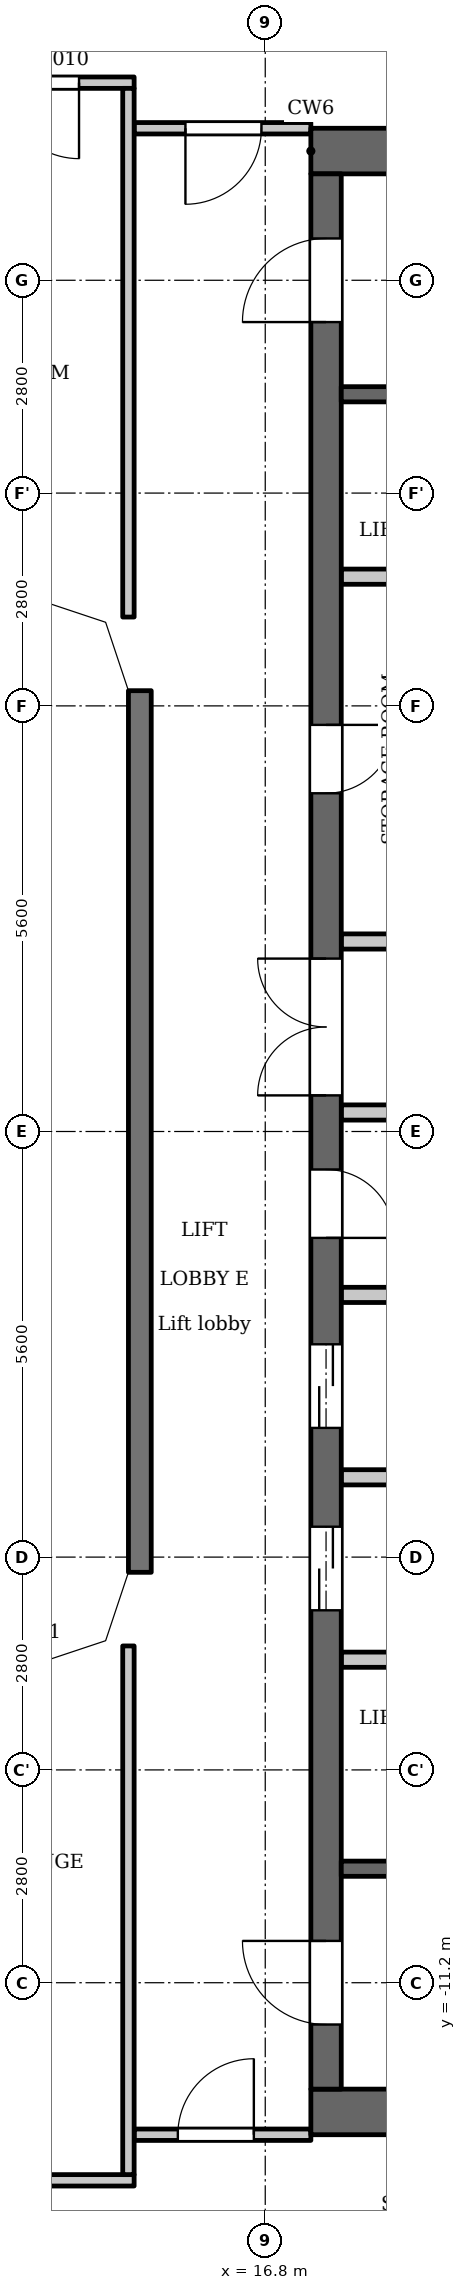
"""IFC4 building model, lengths in metres.
Left out: names, types, materials, properties, quantities, classifications, styles, units other than length and angle.
Written with IfcOpenShell. Run it as: python <this file> out.ifc"""

import sys

from ifc_helpers import new_model, si_unit, direction, frame, frame_2d, origin, place, context, subcontext, project, spatial, polyline, rectangle, outline, extrude, element, fill, save


model = new_model("IFC4")
c1 = context("Model", 3, precision=1e-05, world=origin(), true_north=direction((0.0, 1.0)))
c2 = subcontext(c1, "Body", "Model", "MODEL_VIEW")
j1 = project(units=[si_unit("LENGTHUNIT", "METRE"), si_unit("PLANEANGLEUNIT", "RADIAN")], contexts=[c1])
p1 = place(None, origin())
s1 = spatial("IfcSite", under=j1, at=p1, CompositionType="ELEMENT")
p2 = place(p1, origin())
s2 = spatial("IfcBuilding", under=s1, at=p2, CompositionType="ELEMENT")
p3 = place(p2, frame((0.0, 0.0, 248.7)))
s3 = spatial("IfcBuildingStorey", under=s2, at=p3, CompositionType="ELEMENT", Elevation=248.7)
p4 = place(p3, frame((15.15, 5.8, 0.0), z_axis=(0.0, 0.0, 1.0), x_axis=(0.0, -1.0, 0.0)))
e1 = element("IfcWall", 1, at=p4, inside=s3, PredefinedType="SOLIDWALL", context=c2, shape_type="SweptSolid", body=[
    extrude(rectangle(XDim=11.6, YDim=0.3, at=frame_2d((5.8, 0.0))), origin(), (0.0, 0.0, 1.0), 3.2),
])
for number, where, z_axis, x_axis in (
    (2, (17.4, 12.9, 0.0), (0.0, 0.0, 1.0), (1.0, 0.0, 0.0)),
    (3, (17.4, -12.9, 0.0), (0.0, 0.0, 1.0), (1.0, 0.0, 0.0)),
):
    element("IfcWall", number, at=place(p3, frame(where, z_axis=z_axis, x_axis=x_axis)), inside=s3, PredefinedType="SHEAR", context=c2, shape_type="SweptSolid", body=[
        extrude(rectangle(XDim=7.32, YDim=0.6, at=frame_2d((3.66, 0.0))), origin(), (0.0, 0.0, 1.0), 3.2),
    ])
p5 = place(p3, frame((17.6, -12.6, 0.0), z_axis=(0.0, 0.0, 1.0), x_axis=(0.0, 1.0, 0.0)))
e4 = element("IfcWall", 4, at=p5, inside=s3, PredefinedType="SHEAR", context=c2, shape_type="SweptSolid", body=[
    extrude(rectangle(XDim=25.2, YDim=0.4, at=frame_2d((12.6, 0.0))), origin(), (0.0, 0.0, 1.0), 3.2),
])
p6 = place(p5, frame((6.3, 0.0, 0.0)))
e5 = element("IfcOpeningElement", 5, at=p6, cuts=e4, PredefinedType="OPENING", context=c2, shape_type="SweptSolid", body=[
    extrude(rectangle(XDim=1.1, YDim=2.1, at=frame_2d((0.55, 1.05))), frame((0.0, 0.21, 0.0), z_axis=(0.0, -1.0, 0.0), x_axis=(1.0, 0.0, 0.0)), (0.0, 0.0, 1.0), 0.42),
])
p7 = place(p5, frame((8.7, 0.0, 0.0)))
e6 = element("IfcOpeningElement", 6, at=p7, cuts=e4, PredefinedType="OPENING", context=c2, shape_type="SweptSolid", body=[
    extrude(rectangle(XDim=1.1, YDim=2.1, at=frame_2d((0.55, 1.05))), frame((0.0, 0.21, 0.0), z_axis=(0.0, -1.0, 0.0), x_axis=(1.0, 0.0, 0.0)), (0.0, 0.0, 1.0), 0.42),
])
p8 = place(p5, frame((11.2, 0.0, 0.0)))
e7 = element("IfcOpeningElement", 7, at=p8, cuts=e4, PredefinedType="OPENING", context=c2, shape_type="SweptSolid", body=[
    extrude(rectangle(XDim=0.9, YDim=2.1, at=frame_2d((0.45, 1.05))), frame((0.0, 0.21, 0.0), z_axis=(0.0, -1.0, 0.0), x_axis=(1.0, 0.0, 0.0)), (0.0, 0.0, 1.0), 0.42),
])
p9 = place(p5, frame((17.05, 0.0, 0.0)))
e8 = element("IfcOpeningElement", 8, at=p9, cuts=e4, PredefinedType="OPENING", context=c2, shape_type="SweptSolid", body=[
    extrude(rectangle(XDim=0.9, YDim=2.1, at=frame_2d((0.45, 1.05))), frame((0.0, 0.21, 0.0), z_axis=(0.0, -1.0, 0.0), x_axis=(1.0, 0.0, 0.0)), (0.0, 0.0, 1.0), 0.42),
])
p10 = place(p5, frame((23.25, 0.0, 0.0)))
e9 = element("IfcOpeningElement", 9, at=p10, cuts=e4, PredefinedType="OPENING", context=c2, shape_type="SweptSolid", body=[
    extrude(rectangle(XDim=1.1, YDim=2.1, at=frame_2d((0.55, 1.05))), frame((0.0, 0.21, 0.0), z_axis=(0.0, -1.0, 0.0), x_axis=(1.0, 0.0, 0.0)), (0.0, 0.0, 1.0), 0.42),
])
p11 = place(p5, frame((0.85, 0.0, 0.0)))
e10 = element("IfcOpeningElement", 10, at=p11, cuts=e4, PredefinedType="OPENING", context=c2, shape_type="SweptSolid", body=[
    extrude(rectangle(XDim=1.1, YDim=2.1, at=frame_2d((0.55, 1.05))), frame((0.0, 0.21, 0.0), z_axis=(0.0, -1.0, 0.0), x_axis=(1.0, 0.0, 0.0)), (0.0, 0.0, 1.0), 0.42),
])
p12 = place(p5, frame((13.075, 0.0, 0.0)))
e11 = element("IfcOpeningElement", 11, at=p12, cuts=e4, PredefinedType="OPENING", context=c2, shape_type="SweptSolid", body=[
    extrude(rectangle(XDim=1.8, YDim=2.1, at=frame_2d((0.9, 1.05))), frame((0.0, 0.21, 0.0), z_axis=(0.0, -1.0, 0.0), x_axis=(1.0, 0.0, 0.0)), (0.0, 0.0, 1.0), 0.42),
])
p13 = place(p3, frame((17.8, -9.7, 0.0), z_axis=(0.0, 0.0, 1.0), x_axis=(1.0, 0.0, 0.0)))
e12 = element("IfcWall", 12, at=p13, inside=s3, PredefinedType="SHEAR", context=c2, shape_type="SweptSolid", body=[
    extrude(rectangle(XDim=5.8, YDim=0.2, at=frame_2d((2.9, 0.0))), origin(), (0.0, 0.0, 1.0), 3.2),
])
p14 = place(p13, frame((0.85, 0.0, 0.0)))
e13 = element("IfcOpeningElement", 13, at=p14, cuts=e12, PredefinedType="OPENING", context=c2, shape_type="SweptSolid", body=[
    extrude(rectangle(XDim=1.1, YDim=2.1, at=frame_2d((0.55, 1.05))), frame((0.0, 0.11, 0.0), z_axis=(0.0, -1.0, 0.0), x_axis=(1.0, 0.0, 0.0)), (0.0, 0.0, 1.0), 0.22),
])
p15 = place(p13, frame((3.75, 0.0, 0.0)))
e14 = element("IfcOpeningElement", 14, at=p15, cuts=e12, PredefinedType="OPENING", context=c2, shape_type="SweptSolid", body=[
    extrude(rectangle(XDim=1.1, YDim=2.1, at=frame_2d((0.55, 1.05))), frame((0.0, 0.11, 0.0), z_axis=(0.0, -1.0, 0.0), x_axis=(1.0, 0.0, 0.0)), (0.0, 0.0, 1.0), 0.22),
])
for number, where, z_axis, x_axis in (
    (15, (17.8, -6.95, 0.0), (0.0, 0.0, 1.0), (1.0, 0.0, 0.0)),
    (16, (17.8, -4.55, 0.0), (0.0, 0.0, 1.0), (1.0, 0.0, 0.0)),
    (17, (17.8, -2.15, 0.0), (0.0, 0.0, 1.0), (1.0, 0.0, 0.0)),
):
    element("IfcWall", number, at=place(p3, frame(where, z_axis=z_axis, x_axis=x_axis)), inside=s3, PredefinedType="PARTITIONING", context=c2, shape_type="SweptSolid", body=[
        extrude(rectangle(XDim=2.8, YDim=0.2, at=frame_2d((1.4, 0.0))), origin(), (0.0, 0.0, 1.0), 3.2),
    ])
p16 = place(p3, frame((17.8, 0.25, 0.0), z_axis=(0.0, 0.0, 1.0), x_axis=(1.0, 0.0, 0.0)))
e18 = element("IfcWall", 18, at=p16, inside=s3, PredefinedType="PARTITIONING", context=c2, shape_type="SweptSolid", body=[
    extrude(rectangle(XDim=3.0, YDim=0.2, at=frame_2d((1.5, 0.0))), origin(), (0.0, 0.0, 1.0), 3.2),
])
p17 = place(p3, frame((17.8, 2.5, 0.0), z_axis=(0.0, 0.0, 1.0), x_axis=(1.0, 0.0, 0.0)))
e19 = element("IfcWall", 19, at=p17, inside=s3, PredefinedType="PARTITIONING", context=c2, shape_type="SweptSolid", body=[
    extrude(rectangle(XDim=3.0, YDim=0.2, at=frame_2d((1.5, 0.0))), origin(), (0.0, 0.0, 1.0), 3.2),
])
p18 = place(p17, frame((1.7, 0.0, 0.0)))
e20 = element("IfcOpeningElement", 20, at=p18, cuts=e19, PredefinedType="OPENING", context=c2, shape_type="SweptSolid", body=[
    extrude(rectangle(XDim=0.9, YDim=2.1, at=frame_2d((0.45, 1.05))), frame((0.0, 0.11, 0.0), z_axis=(0.0, -1.0, 0.0), x_axis=(1.0, 0.0, 0.0)), (0.0, 0.0, 1.0), 0.22),
])
p19 = place(p3, frame((17.8, 7.3, 0.0), z_axis=(0.0, 0.0, 1.0), x_axis=(1.0, 0.0, 0.0)))
e21 = element("IfcWall", 21, at=p19, inside=s3, PredefinedType="PARTITIONING", context=c2, shape_type="SweptSolid", body=[
    extrude(rectangle(XDim=2.8, YDim=0.2, at=frame_2d((1.4, 0.0))), origin(), (0.0, 0.0, 1.0), 3.2),
])
p20 = place(p3, frame((17.8, 9.7, 0.0), z_axis=(0.0, 0.0, 1.0), x_axis=(1.0, 0.0, 0.0)))
e22 = element("IfcWall", 22, at=p20, inside=s3, PredefinedType="SHEAR", context=c2, shape_type="SweptSolid", body=[
    extrude(rectangle(XDim=5.8, YDim=0.2, at=frame_2d((2.9, 0.0))), origin(), (0.0, 0.0, 1.0), 3.2),
])
p21 = place(p20, frame((0.85, 0.0, 0.0)))
e23 = element("IfcOpeningElement", 23, at=p21, cuts=e22, PredefinedType="OPENING", context=c2, shape_type="SweptSolid", body=[
    extrude(rectangle(XDim=1.1, YDim=2.1, at=frame_2d((0.55, 1.05))), frame((0.0, 0.11, 0.0), z_axis=(0.0, -1.0, 0.0), x_axis=(1.0, 0.0, 0.0)), (0.0, 0.0, 1.0), 0.22),
])
p22 = place(p20, frame((3.75, 0.0, 0.0)))
e24 = element("IfcOpeningElement", 24, at=p22, cuts=e22, PredefinedType="OPENING", context=c2, shape_type="SweptSolid", body=[
    extrude(rectangle(XDim=1.1, YDim=2.1, at=frame_2d((0.55, 1.05))), frame((0.0, 0.11, 0.0), z_axis=(0.0, -1.0, 0.0), x_axis=(1.0, 0.0, 0.0)), (0.0, 0.0, 1.0), 0.22),
])
p23 = place(p3, frame((-15.075, -13.8, 0.0), z_axis=(0.0, 0.0, 1.0), x_axis=(1.0, 0.0, 0.0)))
e25 = element("IfcWall", 25, at=p23, inside=s3, PredefinedType="PARTITIONING", context=c2, shape_type="SweptSolid", body=[
    extrude(rectangle(XDim=30.15, YDim=0.15, at=frame_2d((15.075, 0.0))), origin(), (0.0, 0.0, 1.0), 3.2),
])
p24 = place(p23, frame((2.225, 0.0, 0.0)))
e26 = element("IfcOpeningElement", 26, at=p24, cuts=e25, PredefinedType="OPENING", context=c2, shape_type="SweptSolid", body=[
    extrude(rectangle(XDim=1.0, YDim=2.1, at=frame_2d((0.5, 1.05))), frame((0.0, 0.085, 0.0), z_axis=(0.0, -1.0, 0.0), x_axis=(1.0, 0.0, 0.0)), (0.0, 0.0, 1.0), 0.17),
])
p25 = place(p23, frame((4.575, 0.0, 0.0)))
e27 = element("IfcOpeningElement", 27, at=p25, cuts=e25, PredefinedType="OPENING", context=c2, shape_type="SweptSolid", body=[
    extrude(rectangle(XDim=1.0, YDim=2.1, at=frame_2d((0.5, 1.05))), frame((0.0, 0.085, 0.0), z_axis=(0.0, -1.0, 0.0), x_axis=(1.0, 0.0, 0.0)), (0.0, 0.0, 1.0), 0.17),
])
p26 = place(p23, frame((13.425, 0.0, 0.0)))
e28 = element("IfcOpeningElement", 28, at=p26, cuts=e25, PredefinedType="OPENING", context=c2, shape_type="SweptSolid", body=[
    extrude(rectangle(XDim=1.0, YDim=2.1, at=frame_2d((0.5, 1.05))), frame((0.0, 0.085, 0.0), z_axis=(0.0, -1.0, 0.0), x_axis=(1.0, 0.0, 0.0)), (0.0, 0.0, 1.0), 0.17),
])
p27 = place(p23, frame((15.775, 0.0, 0.0)))
e29 = element("IfcOpeningElement", 29, at=p27, cuts=e25, PredefinedType="OPENING", context=c2, shape_type="SweptSolid", body=[
    extrude(rectangle(XDim=1.0, YDim=2.1, at=frame_2d((0.5, 1.05))), frame((0.0, 0.085, 0.0), z_axis=(0.0, -1.0, 0.0), x_axis=(1.0, 0.0, 0.0)), (0.0, 0.0, 1.0), 0.17),
])
p28 = place(p23, frame((24.625, 0.0, 0.0)))
e30 = element("IfcOpeningElement", 30, at=p28, cuts=e25, PredefinedType="OPENING", context=c2, shape_type="SweptSolid", body=[
    extrude(rectangle(XDim=1.0, YDim=2.1, at=frame_2d((0.5, 1.05))), frame((0.0, 0.085, 0.0), z_axis=(0.0, -1.0, 0.0), x_axis=(1.0, 0.0, 0.0)), (0.0, 0.0, 1.0), 0.17),
])
p29 = place(p23, frame((26.924, 0.0, 0.0)))
e31 = element("IfcOpeningElement", 31, at=p29, cuts=e25, PredefinedType="OPENING", context=c2, shape_type="SweptSolid", body=[
    extrude(rectangle(XDim=1.0, YDim=2.1, at=frame_2d((0.5, 1.05))), frame((0.0, 0.085, 0.0), z_axis=(0.0, -1.0, 0.0), x_axis=(1.0, 0.0, 0.0)), (0.0, 0.0, 1.0), 0.17),
])
p30 = place(p3, frame((15.075, -13.2, 0.0), z_axis=(0.0, 0.0, 1.0), x_axis=(1.0, 0.0, 0.0)))
e32 = element("IfcWall", 32, at=p30, inside=s3, PredefinedType="PARTITIONING", context=c2, shape_type="SweptSolid", body=[
    extrude(rectangle(XDim=2.325, YDim=0.15, at=frame_2d((1.163, 0.0))), origin(), (0.0, 0.0, 1.0), 3.2),
])
p31 = place(p30, frame((0.575, 0.0, 0.0)))
e33 = element("IfcOpeningElement", 33, at=p31, cuts=e32, PredefinedType="OPENING", context=c2, shape_type="SweptSolid", body=[
    extrude(rectangle(XDim=1.0, YDim=2.1, at=frame_2d((0.5, 1.05))), frame((0.0, 0.085, 0.0), z_axis=(0.0, -1.0, 0.0), x_axis=(1.0, 0.0, 0.0)), (0.0, 0.0, 1.0), 0.17),
])
p32 = place(p3, frame((15.075, 13.2, 0.0), z_axis=(0.0, 0.0, 1.0), x_axis=(1.0, 0.0, 0.0)))
e34 = element("IfcWall", 34, at=p32, inside=s3, PredefinedType="PARTITIONING", context=c2, shape_type="SweptSolid", body=[
    extrude(rectangle(XDim=2.325, YDim=0.15, at=frame_2d((1.163, 0.0))), origin(), (0.0, 0.0, 1.0), 3.2),
])
p33 = place(p32, frame((0.675, 0.0, 0.0)))
e35 = element("IfcOpeningElement", 35, at=p33, cuts=e34, PredefinedType="OPENING", context=c2, shape_type="SweptSolid", body=[
    extrude(rectangle(XDim=1.0, YDim=2.1, at=frame_2d((0.5, 1.05))), frame((0.0, 0.085, 0.0), z_axis=(0.0, -1.0, 0.0), x_axis=(1.0, 0.0, 0.0)), (0.0, 0.0, 1.0), 0.17),
])
p34 = place(p3, frame((-15.075, 13.8, 0.0), z_axis=(0.0, 0.0, 1.0), x_axis=(1.0, 0.0, 0.0)))
e36 = element("IfcWall", 36, at=p34, inside=s3, PredefinedType="PARTITIONING", context=c2, shape_type="SweptSolid", body=[
    extrude(rectangle(XDim=30.15, YDim=0.15, at=frame_2d((15.075, 0.0))), origin(), (0.0, 0.0, 1.0), 3.2),
])
p35 = place(p34, frame((0.726, 0.0, 0.0)))
e37 = element("IfcOpeningElement", 37, at=p35, cuts=e36, PredefinedType="OPENING", context=c2, shape_type="SweptSolid", body=[
    extrude(rectangle(XDim=1.0, YDim=2.1, at=frame_2d((0.5, 1.05))), frame((0.0, 0.085, 0.0), z_axis=(0.0, -1.0, 0.0), x_axis=(1.0, 0.0, 0.0)), (0.0, 0.0, 1.0), 0.17),
])
p36 = place(p34, frame((7.775, 0.0, 0.0)))
e38 = element("IfcOpeningElement", 38, at=p36, cuts=e36, PredefinedType="OPENING", context=c2, shape_type="SweptSolid", body=[
    extrude(rectangle(XDim=1.0, YDim=2.1, at=frame_2d((0.5, 1.05))), frame((0.0, 0.085, 0.0), z_axis=(0.0, -1.0, 0.0), x_axis=(1.0, 0.0, 0.0)), (0.0, 0.0, 1.0), 0.17),
])
p37 = place(p34, frame((10.125, 0.0, 0.0)))
e39 = element("IfcOpeningElement", 39, at=p37, cuts=e36, PredefinedType="OPENING", context=c2, shape_type="SweptSolid", body=[
    extrude(rectangle(XDim=1.0, YDim=2.1, at=frame_2d((0.5, 1.05))), frame((0.0, 0.085, 0.0), z_axis=(0.0, -1.0, 0.0), x_axis=(1.0, 0.0, 0.0)), (0.0, 0.0, 1.0), 0.17),
])
p38 = place(p34, frame((18.975, 0.0, 0.0)))
e40 = element("IfcOpeningElement", 40, at=p38, cuts=e36, PredefinedType="OPENING", context=c2, shape_type="SweptSolid", body=[
    extrude(rectangle(XDim=1.0, YDim=2.1, at=frame_2d((0.5, 1.05))), frame((0.0, 0.085, 0.0), z_axis=(0.0, -1.0, 0.0), x_axis=(1.0, 0.0, 0.0)), (0.0, 0.0, 1.0), 0.17),
])
p39 = place(p34, frame((21.325, 0.0, 0.0)))
e41 = element("IfcOpeningElement", 41, at=p39, cuts=e36, PredefinedType="OPENING", context=c2, shape_type="SweptSolid", body=[
    extrude(rectangle(XDim=1.0, YDim=2.1, at=frame_2d((0.5, 1.05))), frame((0.0, 0.085, 0.0), z_axis=(0.0, -1.0, 0.0), x_axis=(1.0, 0.0, 0.0)), (0.0, 0.0, 1.0), 0.17),
])
p40 = place(p34, frame((28.425, 0.0, 0.0)))
e42 = element("IfcOpeningElement", 42, at=p40, cuts=e36, PredefinedType="OPENING", context=c2, shape_type="SweptSolid", body=[
    extrude(rectangle(XDim=1.0, YDim=2.1, at=frame_2d((0.5, 1.05))), frame((0.0, 0.085, 0.0), z_axis=(0.0, -1.0, 0.0), x_axis=(1.0, 0.0, 0.0)), (0.0, 0.0, 1.0), 0.17),
])
for number, where, z_axis, x_axis in (
    (43, (15.0, -13.725, 0.0), (0.0, 0.0, 1.0), (0.0, 1.0, 0.0)),
    (44, (15.0, 6.769, 0.0), (0.0, 0.0, 1.0), (0.0, 1.0, 0.0)),
):
    element("IfcWall", number, at=place(p3, frame(where, z_axis=z_axis, x_axis=x_axis)), inside=s3, PredefinedType="PARTITIONING", context=c2, shape_type="SweptSolid", body=[
        extrude(rectangle(XDim=6.956, YDim=0.15, at=frame_2d((3.478, 0.0))), origin(), (0.0, 0.0, 1.0), 3.2),
    ])
p41 = place(p3, origin())
e45 = element("IfcWall", 45, at=p41, inside=s3, PredefinedType="SOLIDWALL", context=c2, shape_type="SweptSolid", body=[
    extrude(outline(polyline([(14.937, 6.937), (13.849, 7.3), (13.8, 7.3), (13.8, 7.0), (14.7, 6.7), (15.0, 5.8), (15.3, 5.8), (15.3, 5.849), (14.937, 6.937)])), origin(), (0.0, 0.0, 1.0), 3.2),
])
e46 = element("IfcWall", 46, at=p41, inside=s3, PredefinedType="SOLIDWALL", context=c2, shape_type="SweptSolid", body=[
    extrude(outline(polyline([(14.937, -6.937), (15.3, -5.849), (15.3, -5.8), (15.0, -5.8), (14.7, -6.7), (13.8, -7.0), (13.8, -7.3), (13.849, -7.3), (14.937, -6.937)])), origin(), (0.0, 0.0, 1.0), 3.2),
])
p42 = place(p6, origin())
e47 = element("IfcDoor", 47, at=p42, inside=s3, OperationType="DOUBLE_DOOR_SLIDING", PredefinedType="DOOR", context=c2, shape_type="SweptSolid", body=[
    extrude(rectangle(XDim=1.1, YDim=2.1, at=frame_2d((0.55, 1.05))), frame((0.0, 0.025, 0.0), z_axis=(0.0, -1.0, 0.0), x_axis=(1.0, 0.0, 0.0)), (0.0, 0.0, 1.0), 0.05),
])
fill(e5, e47)
p43 = place(p7, origin())
e48 = element("IfcDoor", 48, at=p43, inside=s3, OperationType="DOUBLE_DOOR_SLIDING", PredefinedType="DOOR", context=c2, shape_type="SweptSolid", body=[
    extrude(rectangle(XDim=1.1, YDim=2.1, at=frame_2d((0.55, 1.05))), frame((0.0, 0.025, 0.0), z_axis=(0.0, -1.0, 0.0), x_axis=(1.0, 0.0, 0.0)), (0.0, 0.0, 1.0), 0.05),
])
fill(e6, e48)
p44 = place(p8, origin())
e49 = element("IfcDoor", 49, at=p44, inside=s3, OperationType="SINGLE_SWING_LEFT", PredefinedType="DOOR", context=c2, shape_type="SweptSolid", body=[
    extrude(rectangle(XDim=0.9, YDim=2.1, at=frame_2d((0.45, 1.05))), frame((0.0, 0.025, 0.0), z_axis=(0.0, -1.0, 0.0), x_axis=(1.0, 0.0, 0.0)), (0.0, 0.0, 1.0), 0.05),
])
fill(e7, e49)
p45 = place(p9, origin())
e50 = element("IfcDoor", 50, at=p45, inside=s3, OperationType="SINGLE_SWING_RIGHT", PredefinedType="DOOR", context=c2, shape_type="SweptSolid", body=[
    extrude(rectangle(XDim=0.9, YDim=2.1, at=frame_2d((0.45, 1.05))), frame((0.0, 0.025, 0.0), z_axis=(0.0, -1.0, 0.0), x_axis=(1.0, 0.0, 0.0)), (0.0, 0.0, 1.0), 0.05),
])
fill(e8, e50)
p46 = place(p10, origin())
e51 = element("IfcDoor", 51, at=p46, inside=s3, OperationType="SINGLE_SWING_RIGHT", PredefinedType="DOOR", context=c2, shape_type="SweptSolid", body=[
    extrude(rectangle(XDim=1.1, YDim=2.1, at=frame_2d((0.55, 1.05))), frame((0.0, 0.025, 0.0), z_axis=(0.0, -1.0, 0.0), x_axis=(1.0, 0.0, 0.0)), (0.0, 0.0, 1.0), 0.05),
])
fill(e9, e51)
p47 = place(p11, origin())
e52 = element("IfcDoor", 52, at=p47, inside=s3, OperationType="SINGLE_SWING_LEFT", PredefinedType="DOOR", context=c2, shape_type="SweptSolid", body=[
    extrude(rectangle(XDim=1.1, YDim=2.1, at=frame_2d((0.55, 1.05))), frame((0.0, 0.025, 0.0), z_axis=(0.0, -1.0, 0.0), x_axis=(1.0, 0.0, 0.0)), (0.0, 0.0, 1.0), 0.05),
])
fill(e10, e52)
p48 = place(p12, origin())
e53 = element("IfcDoor", 53, at=p48, inside=s3, OperationType="DOUBLE_DOOR_SINGLE_SWING", PredefinedType="DOOR", context=c2, shape_type="SweptSolid", body=[
    extrude(rectangle(XDim=1.8, YDim=2.1, at=frame_2d((0.9, 1.05))), frame((0.0, 0.025, 0.0), z_axis=(0.0, -1.0, 0.0), x_axis=(1.0, 0.0, 0.0)), (0.0, 0.0, 1.0), 0.05),
])
fill(e11, e53)
p49 = place(p33, origin())
e54 = element("IfcDoor", 54, at=p49, inside=s3, OperationType="SINGLE_SWING_LEFT", PredefinedType="DOOR", context=c2, shape_type="SweptSolid", body=[
    extrude(rectangle(XDim=1.0, YDim=2.1, at=frame_2d((0.5, 1.05))), frame((0.0, 0.025, 0.0), z_axis=(0.0, -1.0, 0.0), x_axis=(1.0, 0.0, 0.0)), (0.0, 0.0, 1.0), 0.05),
])
fill(e35, e54)
p50 = place(p31, origin())
e55 = element("IfcDoor", 55, at=p50, inside=s3, OperationType="SINGLE_SWING_LEFT", PredefinedType="DOOR", context=c2, shape_type="SweptSolid", body=[
    extrude(rectangle(XDim=1.0, YDim=2.1, at=frame_2d((0.5, 1.05))), frame((0.0, 0.025, 0.0), z_axis=(0.0, -1.0, 0.0), x_axis=(1.0, 0.0, 0.0)), (0.0, 0.0, 1.0), 0.05),
])
fill(e33, e55)
p51 = place(p40, origin())
e56 = element("IfcDoor", 56, at=p51, inside=s3, OperationType="SINGLE_SWING_RIGHT", PredefinedType="DOOR", context=c2, shape_type="SweptSolid", body=[
    extrude(rectangle(XDim=1.0, YDim=2.1, at=frame_2d((0.5, 1.05))), frame((0.0, 0.025, 0.0), z_axis=(0.0, -1.0, 0.0), x_axis=(1.0, 0.0, 0.0)), (0.0, 0.0, 1.0), 0.05),
])
fill(e42, e56)
save(model, sys.argv[1])
